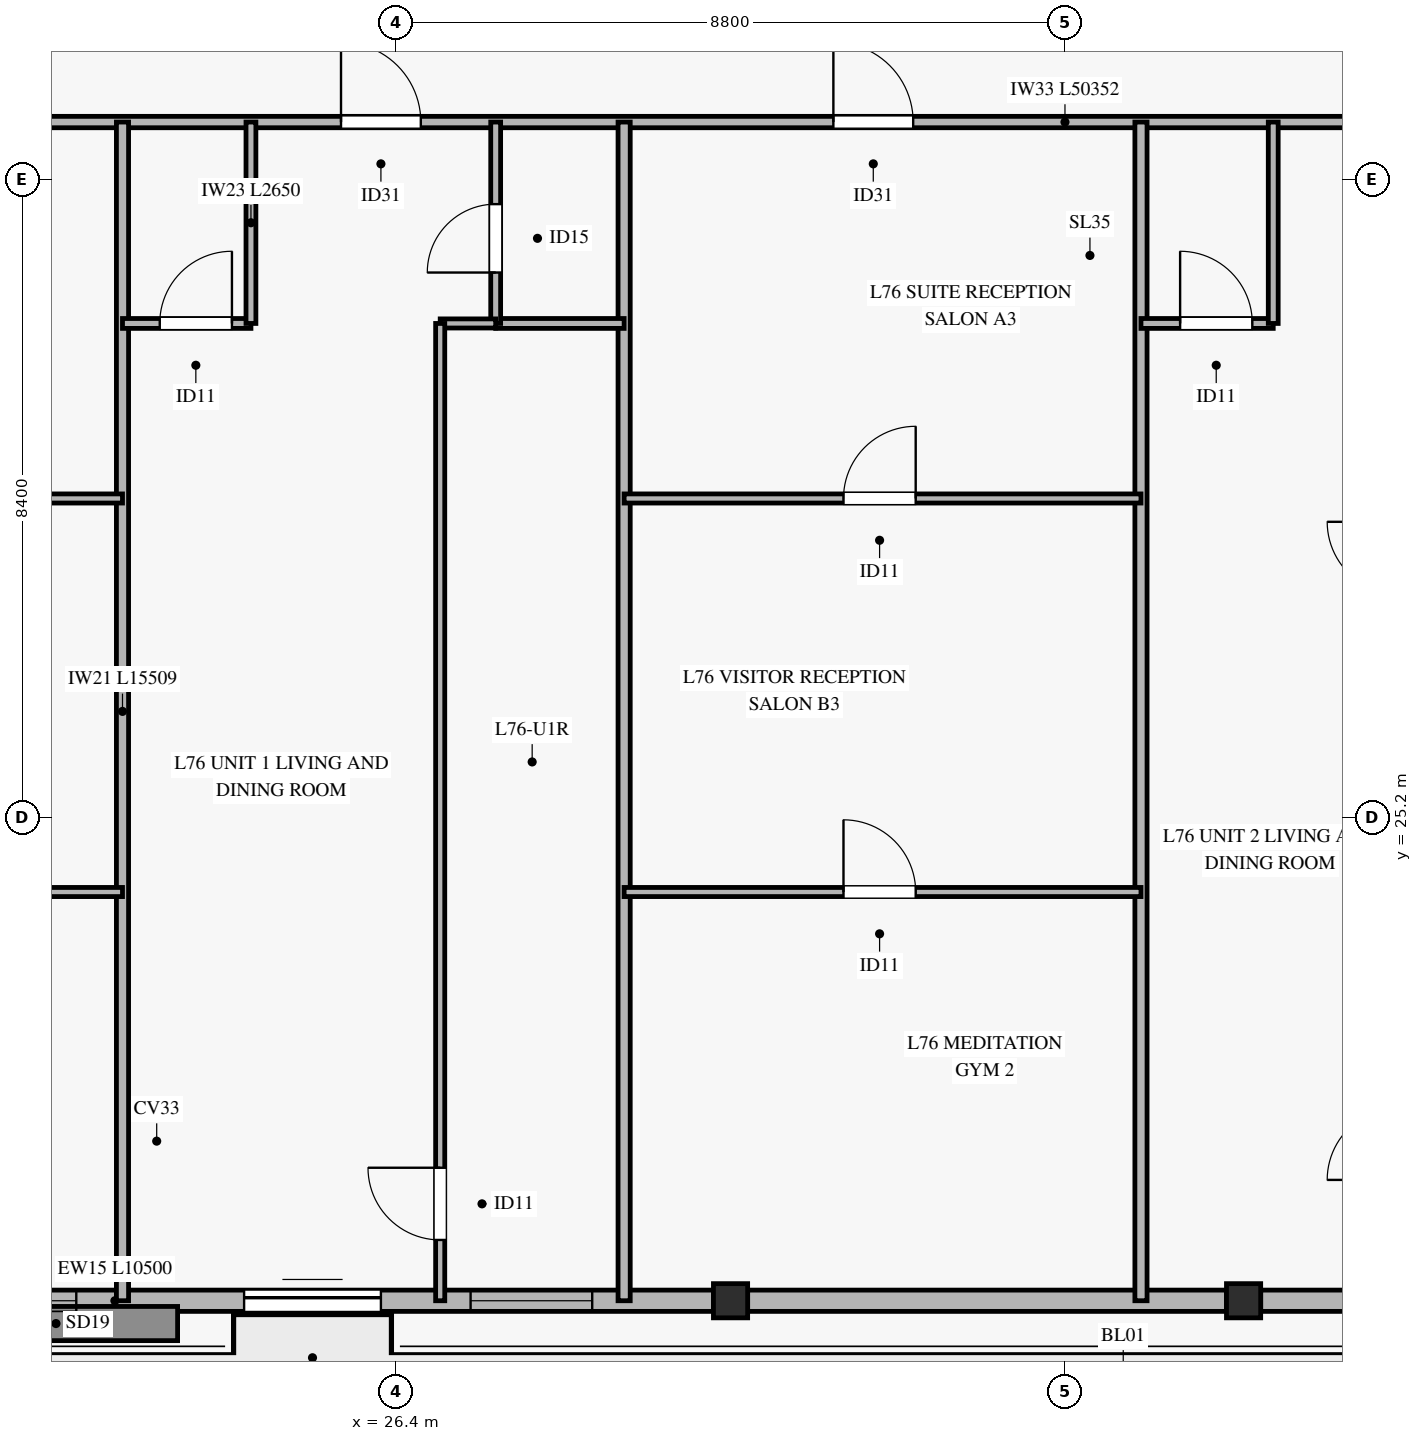
"""IFC4 building model, lengths in metres.
Left out: names, types, materials, properties, quantities, classifications, styles, units other than length and angle.
Written with IfcOpenShell. Run it as: python <this file> out.ifc"""

import sys

from ifc_helpers import new_model, si_unit, direction, frame, frame_2d, origin, origin_2d, place, context, subcontext, project, spatial, rectangle, hollow_rectangle, extrude, source, transform, mapped, element, fill, save


model = new_model("IFC4")
c1 = context("Model", 3, precision=1e-05, world=origin(), true_north=direction((0.0, 1.0)))
c2 = subcontext(c1, "Body", "Model", "MODEL_VIEW")
j1 = project(units=[si_unit("LENGTHUNIT", "METRE"), si_unit("PLANEANGLEUNIT", "RADIAN")], contexts=[c1])
p1 = place(None, origin())
s1 = spatial("IfcSite", under=j1, at=p1, CompositionType="ELEMENT")
p2 = place(p1, origin())
s2 = spatial("IfcBuilding", under=s1, at=p2, CompositionType="ELEMENT")
p3 = place(p2, frame((0.0, 0.0, 297.2)))
s3 = spatial("IfcBuildingStorey", under=s2, at=p3, CompositionType="ELEMENT", Elevation=297.2)
m1 = source(origin(), c2, "Body", "SweptSolid", [
    extrude(hollow_rectangle(XDim=0.45, YDim=0.45, WallThickness=0.022, at=origin_2d()), origin(), (0.0, 0.0, 1.0), 3.185),
])
for number, where, z_axis, x_axis in (
    (1, (30.8, 18.841, 0.0), (0.0, 0.0, 1.0), (1.0, 0.0, 0.0)),
    (2, (37.55, 18.841, 0.0), (0.0, 0.0, 1.0), (1.0, 0.0, 0.0)),
):
    element("IfcColumn", number, at=place(p3, frame(where, z_axis=z_axis, x_axis=x_axis)), inside=s3, PredefinedType="COLUMN", context=c2, shape_type="MappedRepresentation", body=[
        mapped(m1, transform((0.0, 0.0, 0.0), x_axis=(1.0, 0.0, 0.0), y_axis=(0.0, 1.0, 0.0), z_axis=(0.0, 0.0, 1.0), scale=1.0)),
    ])
p4 = place(p3, frame((20.075, 18.841, 0.0), z_axis=(0.0, 0.0, 1.0), x_axis=(1.0, 0.0, 0.0)))
e3 = element("IfcWall", 3, at=p4, inside=s3, PredefinedType="SOLIDWALL", context=c2, shape_type="SweptSolid", body=[
    extrude(rectangle(XDim=10.5, YDim=0.28, at=frame_2d((5.25, 0.0))), origin(), (0.0, 0.0, 1.0), 2.815),
])
p5 = place(p4, frame((4.325, 0.0, 0.0)))
e4 = element("IfcOpeningElement", 4, at=p5, cuts=e3, PredefinedType="OPENING", context=c2, shape_type="SweptSolid", body=[
    extrude(rectangle(XDim=1.8, YDim=2.25, at=frame_2d((0.9, 1.125))), frame((0.0, 0.15, 0.0), z_axis=(0.0, -1.0, 0.0), x_axis=(1.0, 0.0, 0.0)), (0.0, 0.0, 1.0), 0.3),
])
p6 = place(p4, frame((0.517, 0.0, 0.45)))
e5 = element("IfcOpeningElement", 5, at=p6, cuts=e3, PredefinedType="OPENING", context=c2, shape_type="SweptSolid", body=[
    extrude(rectangle(XDim=1.6, YDim=2.0, at=frame_2d((0.8, 1.0))), frame((0.0, 0.15, 0.0), z_axis=(0.0, -1.0, 0.0), x_axis=(1.0, 0.0, 0.0)), (0.0, 0.0, 1.0), 0.3),
])
p7 = place(p4, frame((7.305, 0.0, 0.45)))
e6 = element("IfcOpeningElement", 6, at=p7, cuts=e3, PredefinedType="OPENING", context=c2, shape_type="SweptSolid", body=[
    extrude(rectangle(XDim=1.6, YDim=2.0, at=frame_2d((0.8, 1.0))), frame((0.0, 0.15, 0.0), z_axis=(0.0, -1.0, 0.0), x_axis=(1.0, 0.0, 0.0)), (0.0, 0.0, 1.0), 0.3),
])
for number, where, z_axis, x_axis in (
    (7, (31.025, 18.841, 0.0), (0.0, 0.0, 1.0), (1.0, 0.0, 0.0)),
    (8, (37.775, 18.841, 0.0), (0.0, 0.0, 1.0), (1.0, 0.0, 0.0)),
):
    element("IfcWall", number, at=place(p3, frame(where, z_axis=z_axis, x_axis=x_axis)), inside=s3, PredefinedType="SOLIDWALL", context=c2, shape_type="SweptSolid", body=[
        extrude(rectangle(XDim=6.3, YDim=0.28, at=frame_2d((3.15, 0.0))), origin(), (0.0, 0.0, 1.0), 2.815),
    ])
p8 = place(p3, frame((10.024, 34.35, 0.0), z_axis=(0.0, 0.0, 1.0), x_axis=(1.0, 0.0, 0.0)))
e9 = element("IfcWall", 9, at=p8, inside=s3, PredefinedType="PARTITIONING", context=c2, shape_type="SweptSolid", body=[
    extrude(rectangle(XDim=50.352, YDim=0.15, at=frame_2d((25.176, 0.0))), origin(), (0.0, 0.0, 1.0), 2.47),
])
p9 = place(p8, frame((5.148, 0.0, 0.0)))
e10 = element("IfcOpeningElement", 10, at=p9, cuts=e9, PredefinedType="OPENING", context=c2, shape_type="SweptSolid", body=[
    extrude(rectangle(XDim=1.05, YDim=2.15, at=frame_2d((0.525, 1.075))), frame((0.0, 0.085, 0.0), z_axis=(0.0, -1.0, 0.0), x_axis=(1.0, 0.0, 0.0)), (0.0, 0.0, 1.0), 0.17),
])
p10 = place(p8, frame((15.651, 0.0, 0.0)))
e11 = element("IfcOpeningElement", 11, at=p10, cuts=e9, PredefinedType="OPENING", context=c2, shape_type="SweptSolid", body=[
    extrude(rectangle(XDim=1.05, YDim=2.15, at=frame_2d((0.525, 1.075))), frame((0.0, 0.085, 0.0), z_axis=(0.0, -1.0, 0.0), x_axis=(1.0, 0.0, 0.0)), (0.0, 0.0, 1.0), 0.17),
])
p11 = place(p8, frame((22.129, 0.0, 0.0)))
e12 = element("IfcOpeningElement", 12, at=p11, cuts=e9, PredefinedType="OPENING", context=c2, shape_type="SweptSolid", body=[
    extrude(rectangle(XDim=1.05, YDim=2.15, at=frame_2d((0.525, 1.075))), frame((0.0, 0.085, 0.0), z_axis=(0.0, -1.0, 0.0), x_axis=(1.0, 0.0, 0.0)), (0.0, 0.0, 1.0), 0.17),
])
p12 = place(p8, frame((29.151, 0.0, 0.0)))
e13 = element("IfcOpeningElement", 13, at=p12, cuts=e9, PredefinedType="OPENING", context=c2, shape_type="SweptSolid", body=[
    extrude(rectangle(XDim=1.05, YDim=2.15, at=frame_2d((0.525, 1.075))), frame((0.0, 0.085, 0.0), z_axis=(0.0, -1.0, 0.0), x_axis=(1.0, 0.0, 0.0)), (0.0, 0.0, 1.0), 0.17),
])
p13 = place(p8, frame((35.701, 0.0, 0.0)))
e14 = element("IfcOpeningElement", 14, at=p13, cuts=e9, PredefinedType="OPENING", context=c2, shape_type="SweptSolid", body=[
    extrude(rectangle(XDim=1.05, YDim=2.15, at=frame_2d((0.525, 1.075))), frame((0.0, 0.085, 0.0), z_axis=(0.0, -1.0, 0.0), x_axis=(1.0, 0.0, 0.0)), (0.0, 0.0, 1.0), 0.17),
])
p14 = place(p8, frame((43.578, 0.0, 0.0)))
e15 = element("IfcOpeningElement", 15, at=p14, cuts=e9, PredefinedType="OPENING", context=c2, shape_type="SweptSolid", body=[
    extrude(rectangle(XDim=1.05, YDim=2.15, at=frame_2d((0.525, 1.075))), frame((0.0, 0.085, 0.0), z_axis=(0.0, -1.0, 0.0), x_axis=(1.0, 0.0, 0.0)), (0.0, 0.0, 1.0), 0.17),
])
for number, where, z_axis, x_axis in (
    (16, (22.8, 18.841, 0.0), (0.0, 0.0, 1.0), (0.0, 1.0, 0.0)),
    (17, (29.4, 18.841, 0.0), (0.0, 0.0, 1.0), (0.0, 1.0, 0.0)),
    (18, (36.2, 18.841, 0.0), (0.0, 0.0, 1.0), (0.0, 1.0, 0.0)),
):
    element("IfcWall", number, at=place(p3, frame(where, z_axis=z_axis, x_axis=x_axis)), inside=s3, PredefinedType="PARTITIONING", context=c2, shape_type="SweptSolid", body=[
        extrude(rectangle(XDim=15.509, YDim=0.16, at=frame_2d((7.754, 0.0))), origin(), (0.0, 0.0, 1.0), 2.77),
    ])
p15 = place(p3, frame((10.024, 24.219, 0.0), z_axis=(0.0, 0.0, 1.0), x_axis=(1.0, 0.0, 0.0)))
e19 = element("IfcWall", 19, at=p15, inside=s3, PredefinedType="PARTITIONING", context=c2, shape_type="SweptSolid", body=[
    extrude(rectangle(XDim=12.776, YDim=0.12, at=frame_2d((6.388, 0.0))), origin(), (0.0, 0.0, 1.0), 2.47),
])
p16 = place(p15, frame((5.396, 0.0, 0.0)))
e20 = element("IfcOpeningElement", 20, at=p16, cuts=e19, PredefinedType="OPENING", context=c2, shape_type="SweptSolid", body=[
    extrude(rectangle(XDim=0.95, YDim=2.1, at=frame_2d((0.475, 1.05))), frame((0.0, 0.07, 0.0), z_axis=(0.0, -1.0, 0.0), x_axis=(1.0, 0.0, 0.0)), (0.0, 0.0, 1.0), 0.14),
])
p17 = place(p3, frame((10.024, 29.397, 0.0), z_axis=(0.0, 0.0, 1.0), x_axis=(1.0, 0.0, 0.0)))
e21 = element("IfcWall", 21, at=p17, inside=s3, PredefinedType="PARTITIONING", context=c2, shape_type="SweptSolid", body=[
    extrude(rectangle(XDim=12.776, YDim=0.12, at=frame_2d((6.388, 0.0))), origin(), (0.0, 0.0, 1.0), 2.47),
])
p18 = place(p17, frame((5.396, 0.0, 0.0)))
e22 = element("IfcOpeningElement", 22, at=p18, cuts=e21, PredefinedType="OPENING", context=c2, shape_type="SweptSolid", body=[
    extrude(rectangle(XDim=0.95, YDim=2.1, at=frame_2d((0.475, 1.05))), frame((0.0, 0.07, 0.0), z_axis=(0.0, -1.0, 0.0), x_axis=(1.0, 0.0, 0.0)), (0.0, 0.0, 1.0), 0.14),
])
p19 = place(p3, frame((22.8, 31.7, 0.0), z_axis=(0.0, 0.0, 1.0), x_axis=(1.0, 0.0, 0.0)))
e23 = element("IfcWall", 23, at=p19, inside=s3, PredefinedType="PARTITIONING", context=c2, shape_type="SweptSolid", body=[
    extrude(rectangle(XDim=1.69, YDim=0.13, at=frame_2d((0.845, 0.0))), origin(), (0.0, 0.0, 1.0), 3.185),
])
p20 = place(p19, frame((0.49, 0.0, 0.0)))
e24 = element("IfcOpeningElement", 24, at=p20, cuts=e23, PredefinedType="OPENING", context=c2, shape_type="SweptSolid", body=[
    extrude(rectangle(XDim=0.95, YDim=2.1, at=frame_2d((0.475, 1.05))), frame((0.0, 0.075, 0.0), z_axis=(0.0, -1.0, 0.0), x_axis=(1.0, 0.0, 0.0)), (0.0, 0.0, 1.0), 0.15),
])
p21 = place(p3, frame((24.49, 31.7, 0.0), z_axis=(0.0, 0.0, 1.0), x_axis=(0.0, 1.0, 0.0)))
e25 = element("IfcWall", 25, at=p21, inside=s3, PredefinedType="PARTITIONING", context=c2, shape_type="SweptSolid", body=[
    extrude(rectangle(XDim=2.65, YDim=0.13, at=frame_2d((1.325, 0.0))), origin(), (0.0, 0.0, 1.0), 2.77),
])
p22 = place(p3, frame((27.71, 31.7, 0.0), z_axis=(0.0, 0.0, 1.0), x_axis=(1.0, 0.0, 0.0)))
e26 = element("IfcWall", 26, at=p22, inside=s3, PredefinedType="PARTITIONING", context=c2, shape_type="SweptSolid", body=[
    extrude(rectangle(XDim=1.69, YDim=0.13, at=frame_2d((0.845, 0.0))), origin(), (0.0, 0.0, 1.0), 3.185),
])
p23 = place(p3, frame((27.71, 31.7, 0.0), z_axis=(0.0, 0.0, 1.0), x_axis=(0.0, 1.0, 0.0)))
e27 = element("IfcWall", 27, at=p23, inside=s3, PredefinedType="PARTITIONING", context=c2, shape_type="SweptSolid", body=[
    extrude(rectangle(XDim=2.65, YDim=0.13, at=frame_2d((1.325, 0.0))), origin(), (0.0, 0.0, 1.0), 2.77),
])
p24 = place(p23, frame((0.67, 0.0, 0.0)))
e28 = element("IfcOpeningElement", 28, at=p24, cuts=e27, PredefinedType="OPENING", context=c2, shape_type="SweptSolid", body=[
    extrude(rectangle(XDim=0.9, YDim=2.1, at=frame_2d((0.45, 1.05))), frame((0.0, 0.075, 0.0), z_axis=(0.0, -1.0, 0.0), x_axis=(1.0, 0.0, 0.0)), (0.0, 0.0, 1.0), 0.15),
])
p25 = place(p3, frame((26.98, 31.7, 0.0), z_axis=(0.0, 0.0, 1.0), x_axis=(1.0, 0.0, 0.0)))
e29 = element("IfcWall", 29, at=p25, inside=s3, PredefinedType="PARTITIONING", context=c2, shape_type="SweptSolid", body=[
    extrude(rectangle(XDim=0.73, YDim=0.12, at=frame_2d((0.365, 0.0))), origin(), (0.0, 0.0, 1.0), 3.185),
])
p26 = place(p3, frame((26.98, 18.841, 0.0), z_axis=(0.0, 0.0, 1.0), x_axis=(0.0, 1.0, 0.0)))
e30 = element("IfcWall", 30, at=p26, inside=s3, PredefinedType="PARTITIONING", context=c2, shape_type="SweptSolid", body=[
    extrude(rectangle(XDim=12.859, YDim=0.12, at=frame_2d((6.429, 0.0))), origin(), (0.0, 0.0, 1.0), 2.77),
])
p27 = place(p26, frame((0.8, 0.0, 0.0)))
e31 = element("IfcOpeningElement", 31, at=p27, cuts=e30, PredefinedType="OPENING", context=c2, shape_type="SweptSolid", body=[
    extrude(rectangle(XDim=0.95, YDim=2.1, at=frame_2d((0.475, 1.05))), frame((0.0, 0.07, 0.0), z_axis=(0.0, -1.0, 0.0), x_axis=(1.0, 0.0, 0.0)), (0.0, 0.0, 1.0), 0.14),
])
p28 = place(p3, frame((29.4, 24.219, 0.0), z_axis=(0.0, 0.0, 1.0), x_axis=(1.0, 0.0, 0.0)))
e32 = element("IfcWall", 32, at=p28, inside=s3, PredefinedType="PARTITIONING", context=c2, shape_type="SweptSolid", body=[
    extrude(rectangle(XDim=6.8, YDim=0.12, at=frame_2d((3.4, 0.0))), origin(), (0.0, 0.0, 1.0), 2.47),
])
p29 = place(p28, frame((2.886, 0.0, 0.0)))
e33 = element("IfcOpeningElement", 33, at=p29, cuts=e32, PredefinedType="OPENING", context=c2, shape_type="SweptSolid", body=[
    extrude(rectangle(XDim=0.95, YDim=2.1, at=frame_2d((0.475, 1.05))), frame((0.0, 0.07, 0.0), z_axis=(0.0, -1.0, 0.0), x_axis=(1.0, 0.0, 0.0)), (0.0, 0.0, 1.0), 0.14),
])
p30 = place(p3, frame((29.4, 29.397, 0.0), z_axis=(0.0, 0.0, 1.0), x_axis=(1.0, 0.0, 0.0)))
e34 = element("IfcWall", 34, at=p30, inside=s3, PredefinedType="PARTITIONING", context=c2, shape_type="SweptSolid", body=[
    extrude(rectangle(XDim=6.8, YDim=0.12, at=frame_2d((3.4, 0.0))), origin(), (0.0, 0.0, 1.0), 2.47),
])
p31 = place(p30, frame((2.886, 0.0, 0.0)))
e35 = element("IfcOpeningElement", 35, at=p31, cuts=e34, PredefinedType="OPENING", context=c2, shape_type="SweptSolid", body=[
    extrude(rectangle(XDim=0.95, YDim=2.1, at=frame_2d((0.475, 1.05))), frame((0.0, 0.07, 0.0), z_axis=(0.0, -1.0, 0.0), x_axis=(1.0, 0.0, 0.0)), (0.0, 0.0, 1.0), 0.14),
])
p32 = place(p3, frame((36.2, 31.7, 0.0), z_axis=(0.0, 0.0, 1.0), x_axis=(1.0, 0.0, 0.0)))
e36 = element("IfcWall", 36, at=p32, inside=s3, PredefinedType="PARTITIONING", context=c2, shape_type="SweptSolid", body=[
    extrude(rectangle(XDim=1.74, YDim=0.13, at=frame_2d((0.87, 0.0))), origin(), (0.0, 0.0, 1.0), 2.47),
])
p33 = place(p32, frame((0.515, 0.0, 0.0)))
e37 = element("IfcOpeningElement", 37, at=p33, cuts=e36, PredefinedType="OPENING", context=c2, shape_type="SweptSolid", body=[
    extrude(rectangle(XDim=0.95, YDim=2.1, at=frame_2d((0.475, 1.05))), frame((0.0, 0.075, 0.0), z_axis=(0.0, -1.0, 0.0), x_axis=(1.0, 0.0, 0.0)), (0.0, 0.0, 1.0), 0.15),
])
p34 = place(p3, frame((37.94, 31.7, 0.0), z_axis=(0.0, 0.0, 1.0), x_axis=(0.0, 1.0, 0.0)))
e38 = element("IfcWall", 38, at=p34, inside=s3, PredefinedType="PARTITIONING", context=c2, shape_type="SweptSolid", body=[
    extrude(rectangle(XDim=2.65, YDim=0.13, at=frame_2d((1.325, 0.0))), origin(), (0.0, 0.0, 1.0), 2.77),
])
m2 = source(origin(), c2, "Body", "SweptSolid", [
    extrude(rectangle(XDim=1.8, YDim=2.25, at=frame_2d((0.9, 1.125))), frame((0.0, 0.025, 0.0), z_axis=(0.0, -1.0, 0.0), x_axis=(1.0, 0.0, 0.0)), (0.0, 0.0, 1.0), 0.05),
])
p35 = place(p5, origin())
e39 = element("IfcDoor", 39, at=p35, inside=s3, OperationType="SLIDING_TO_LEFT", PredefinedType="DOOR", context=c2, shape_type="MappedRepresentation", body=[
    mapped(m2, transform((0.0, 0.0, 0.0), x_axis=(1.0, 0.0, 0.0), y_axis=(0.0, 1.0, 0.0), z_axis=(0.0, 0.0, 1.0), scale=1.0)),
])
fill(e4, e39)
m3 = source(origin(), c2, "Body", "SweptSolid", [
    extrude(rectangle(XDim=1.6, YDim=2.0, at=frame_2d((0.8, 1.0))), frame((0.0, 0.03, 0.0), z_axis=(0.0, -1.0, 0.0), x_axis=(1.0, 0.0, 0.0)), (0.0, 0.0, 1.0), 0.06),
])
p36 = place(p6, origin())
e40 = element("IfcWindow", 40, at=p36, inside=s3, PartitioningType="SINGLE_PANEL", PredefinedType="WINDOW", context=c2, shape_type="MappedRepresentation", body=[
    mapped(m3, transform((0.0, 0.0, 0.0), x_axis=(1.0, 0.0, 0.0), y_axis=(0.0, 1.0, 0.0), z_axis=(0.0, 0.0, 1.0), scale=1.0)),
])
fill(e5, e40)
p37 = place(p7, origin())
e41 = element("IfcWindow", 41, at=p37, inside=s3, PartitioningType="SINGLE_PANEL", PredefinedType="WINDOW", context=c2, shape_type="MappedRepresentation", body=[
    mapped(m3, transform((0.0, 0.0, 0.0), x_axis=(1.0, 0.0, 0.0), y_axis=(0.0, 1.0, 0.0), z_axis=(0.0, 0.0, 1.0), scale=1.0)),
])
fill(e6, e41)
m4 = source(origin(), c2, "Body", "SweptSolid", [
    extrude(rectangle(XDim=1.05, YDim=2.15, at=frame_2d((0.525, 1.075))), frame((0.0, 0.025, 0.0), z_axis=(0.0, -1.0, 0.0), x_axis=(1.0, 0.0, 0.0)), (0.0, 0.0, 1.0), 0.05),
])
p38 = place(p10, origin())
e42 = element("IfcDoor", 42, at=p38, inside=s3, OperationType="SINGLE_SWING_LEFT", PredefinedType="DOOR", context=c2, shape_type="MappedRepresentation", body=[
    mapped(m4, transform((0.0, 0.0, 0.0), x_axis=(1.0, 0.0, 0.0), y_axis=(0.0, 1.0, 0.0), z_axis=(0.0, 0.0, 1.0), scale=1.0)),
])
fill(e11, e42)
m5 = source(origin(), c2, "Body", "SweptSolid", [
    extrude(rectangle(XDim=0.95, YDim=2.1, at=frame_2d((0.475, 1.05))), frame((0.0, 0.025, 0.0), z_axis=(0.0, -1.0, 0.0), x_axis=(1.0, 0.0, 0.0)), (0.0, 0.0, 1.0), 0.05),
])
p39 = place(p20, origin())
e43 = element("IfcDoor", 43, at=p39, inside=s3, OperationType="SINGLE_SWING_RIGHT", PredefinedType="DOOR", context=c2, shape_type="MappedRepresentation", body=[
    mapped(m5, transform((0.0, 0.0, 0.0), x_axis=(1.0, 0.0, 0.0), y_axis=(0.0, 1.0, 0.0), z_axis=(0.0, 0.0, 1.0), scale=1.0)),
])
fill(e24, e43)
m6 = source(origin(), c2, "Body", "SweptSolid", [
    extrude(rectangle(XDim=0.9, YDim=2.1, at=frame_2d((0.45, 1.05))), frame((0.0, 0.025, 0.0), z_axis=(0.0, -1.0, 0.0), x_axis=(1.0, 0.0, 0.0)), (0.0, 0.0, 1.0), 0.05),
])
p40 = place(p24, origin())
e44 = element("IfcDoor", 44, at=p40, inside=s3, OperationType="SINGLE_SWING_LEFT", PredefinedType="DOOR", context=c2, shape_type="MappedRepresentation", body=[
    mapped(m6, transform((0.0, 0.0, 0.0), x_axis=(1.0, 0.0, 0.0), y_axis=(0.0, 1.0, 0.0), z_axis=(0.0, 0.0, 1.0), scale=1.0)),
])
fill(e28, e44)
p41 = place(p27, origin())
e45 = element("IfcDoor", 45, at=p41, inside=s3, OperationType="SINGLE_SWING_RIGHT", PredefinedType="DOOR", context=c2, shape_type="MappedRepresentation", body=[
    mapped(m5, transform((0.0, 0.0, 0.0), x_axis=(1.0, 0.0, 0.0), y_axis=(0.0, 1.0, 0.0), z_axis=(0.0, 0.0, 1.0), scale=1.0)),
])
fill(e31, e45)
p42 = place(p11, origin())
e46 = element("IfcDoor", 46, at=p42, inside=s3, OperationType="SINGLE_SWING_LEFT", PredefinedType="DOOR", context=c2, shape_type="MappedRepresentation", body=[
    mapped(m4, transform((0.0, 0.0, 0.0), x_axis=(1.0, 0.0, 0.0), y_axis=(0.0, 1.0, 0.0), z_axis=(0.0, 0.0, 1.0), scale=1.0)),
])
fill(e12, e46)
p43 = place(p31, origin())
e47 = element("IfcDoor", 47, at=p43, inside=s3, OperationType="SINGLE_SWING_RIGHT", PredefinedType="DOOR", context=c2, shape_type="MappedRepresentation", body=[
    mapped(m5, transform((0.0, 0.0, 0.0), x_axis=(1.0, 0.0, 0.0), y_axis=(0.0, 1.0, 0.0), z_axis=(0.0, 0.0, 1.0), scale=1.0)),
])
fill(e35, e47)
p44 = place(p29, origin())
e48 = element("IfcDoor", 48, at=p44, inside=s3, OperationType="SINGLE_SWING_LEFT", PredefinedType="DOOR", context=c2, shape_type="MappedRepresentation", body=[
    mapped(m5, transform((0.0, 0.0, 0.0), x_axis=(1.0, 0.0, 0.0), y_axis=(0.0, 1.0, 0.0), z_axis=(0.0, 0.0, 1.0), scale=1.0)),
])
fill(e33, e48)
p45 = place(p33, origin())
e49 = element("IfcDoor", 49, at=p45, inside=s3, OperationType="SINGLE_SWING_LEFT", PredefinedType="DOOR", context=c2, shape_type="MappedRepresentation", body=[
    mapped(m5, transform((0.0, 0.0, 0.0), x_axis=(1.0, 0.0, 0.0), y_axis=(0.0, 1.0, 0.0), z_axis=(0.0, 0.0, 1.0), scale=1.0)),
])
fill(e37, e49)
save(model, sys.argv[1])
